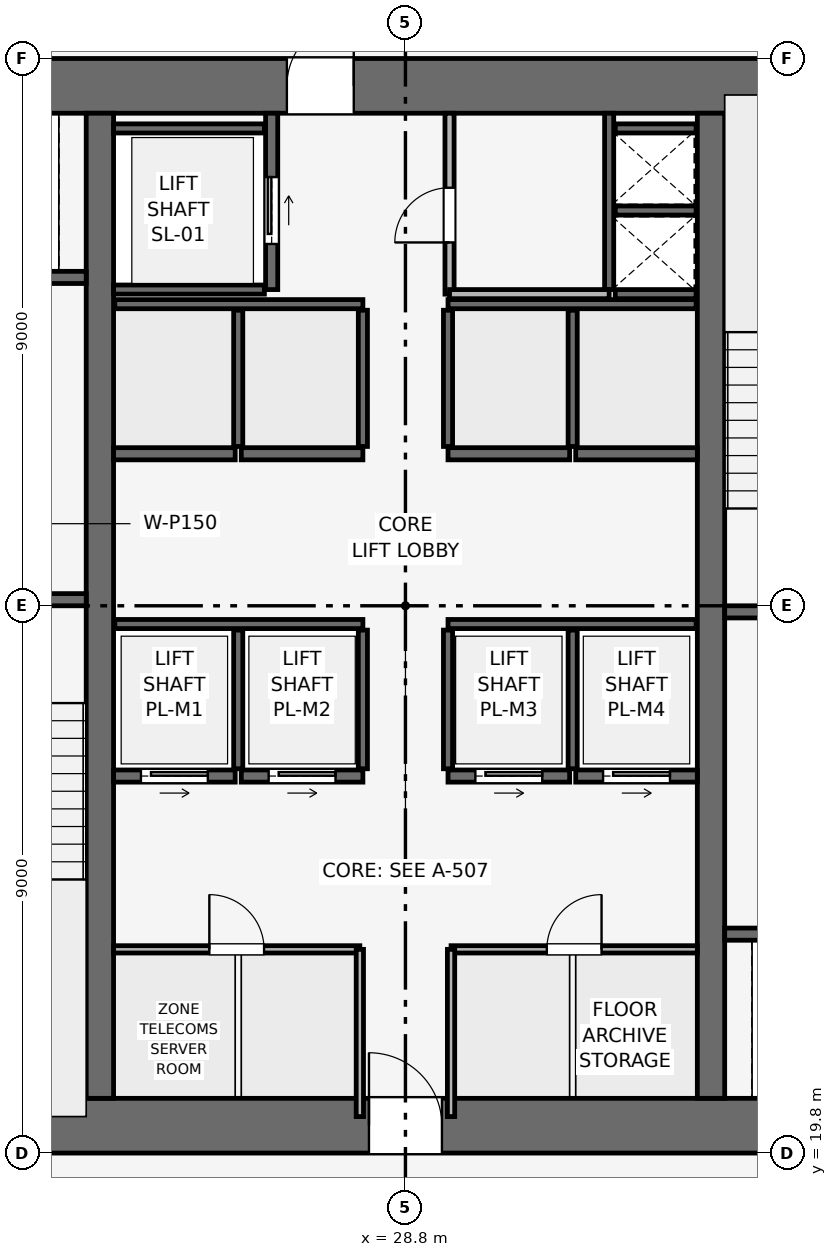
"""IFC4 building model, lengths in metres.
Left out: names, types, materials, properties, quantities, classifications, styles, units other than length and angle.
Written with IfcOpenShell. Run it as: python <this file> out.ifc"""

import sys

from ifc_helpers import new_model, si_unit, direction, frame, frame_2d, origin, place, context, subcontext, project, spatial, rectangle, extrude, element, fill, save


model = new_model("IFC4")
c1 = context("Model", 3, precision=1e-05, world=origin(), true_north=direction((0.0, 1.0)))
c2 = subcontext(c1, "Body", "Model", "MODEL_VIEW")
j1 = project(units=[si_unit("LENGTHUNIT", "METRE"), si_unit("PLANEANGLEUNIT", "RADIAN")], contexts=[c1])
p1 = place(None, origin())
s1 = spatial("IfcSite", under=j1, at=p1, CompositionType="ELEMENT")
p2 = place(p1, origin())
s2 = spatial("IfcBuilding", under=s1, at=p2, CompositionType="ELEMENT")
p3 = place(p2, frame((0.0, 0.0, 145.8)))
s3 = spatial("IfcBuildingStorey", under=s2, at=p3, CompositionType="ELEMENT", Elevation=145.8)
p4 = place(p3, frame((19.8, 20.25, 0.0), z_axis=(0.0, 0.0, 1.0), x_axis=(1.0, 0.0, 0.0)))
e1 = element("IfcWall", 1, at=p4, inside=s3, PredefinedType="SHEAR", context=c2, shape_type="SweptSolid", body=[
    extrude(rectangle(XDim=18.0, YDim=0.9, at=frame_2d((9.0, 0.0))), origin(), (0.0, 0.0, 1.0), 3.75),
])
p5 = place(p4, frame((8.4, 0.0, 0.0)))
e2 = element("IfcOpeningElement", 2, at=p5, cuts=e1, PredefinedType="OPENING", context=c2, shape_type="SweptSolid", body=[
    extrude(rectangle(XDim=1.2, YDim=2.2, at=frame_2d((0.6, 1.1))), frame((0.0, 0.46, 0.0), z_axis=(0.0, -1.0, 0.0), x_axis=(1.0, 0.0, 0.0)), (0.0, 0.0, 1.0), 0.92),
])
p6 = place(p3, frame((19.8, 37.35, 0.0), z_axis=(0.0, 0.0, 1.0), x_axis=(1.0, 0.0, 0.0)))
e3 = element("IfcWall", 3, at=p6, inside=s3, PredefinedType="SHEAR", context=c2, shape_type="SweptSolid", body=[
    extrude(rectangle(XDim=18.0, YDim=0.9, at=frame_2d((9.0, 0.0))), origin(), (0.0, 0.0, 1.0), 3.75),
])
p7 = place(p6, frame((7.05, 0.0, 0.0)))
e4 = element("IfcOpeningElement", 4, at=p7, cuts=e3, PredefinedType="OPENING", context=c2, shape_type="SweptSolid", body=[
    extrude(rectangle(XDim=1.1, YDim=2.15, at=frame_2d((0.55, 1.075))), frame((0.0, 0.46, 0.0), z_axis=(0.0, -1.0, 0.0), x_axis=(1.0, 0.0, 0.0)), (0.0, 0.0, 1.0), 0.92),
])
for number, where, z_axis, x_axis in (
    (5, (23.775, 20.7, 0.0), (0.0, 0.0, 1.0), (0.0, 1.0, 0.0)),
    (6, (33.825, 20.7, 0.0), (0.0, 0.0, 1.0), (0.0, 1.0, 0.0)),
):
    element("IfcWall", number, at=place(p3, frame(where, z_axis=z_axis, x_axis=x_axis)), inside=s3, PredefinedType="SHEAR", context=c2, shape_type="SweptSolid", body=[
        extrude(rectangle(XDim=16.2, YDim=0.45, at=frame_2d((8.1, 0.0))), origin(), (0.0, 0.0, 1.0), 3.75),
    ])
p8 = place(p3, frame((20.4, 28.9, 0.0), z_axis=(0.0, 0.0, 1.0), x_axis=(1.0, 0.0, 0.0)))
e7 = element("IfcWall", 7, at=p8, inside=s3, PredefinedType="SHEAR", context=c2, shape_type="SweptSolid", body=[
    extrude(rectangle(XDim=3.15, YDim=0.2, at=frame_2d((1.575, 0.0))), origin(), (0.0, 0.0, 1.0), 3.495),
])
p9 = place(p8, frame((0.8, 0.0, 0.0)))
e8 = element("IfcOpeningElement", 8, at=p9, cuts=e7, PredefinedType="OPENING", context=c2, shape_type="SweptSolid", body=[
    extrude(rectangle(XDim=1.0, YDim=2.1, at=frame_2d((0.5, 1.05))), frame((0.0, 0.11, 0.0), z_axis=(0.0, -1.0, 0.0), x_axis=(1.0, 0.0, 0.0)), (0.0, 0.0, 1.0), 0.22),
])
p10 = place(p3, frame((34.05, 28.7, 0.0), z_axis=(0.0, 0.0, 1.0), x_axis=(1.0, 0.0, 0.0)))
e9 = element("IfcWall", 9, at=p10, inside=s3, PredefinedType="SHEAR", context=c2, shape_type="SweptSolid", body=[
    extrude(rectangle(XDim=3.15, YDim=0.2, at=frame_2d((1.575, 0.0))), origin(), (0.0, 0.0, 1.0), 3.495),
])
p11 = place(p10, frame((0.8, 0.0, 0.0)))
e10 = element("IfcOpeningElement", 10, at=p11, cuts=e9, PredefinedType="OPENING", context=c2, shape_type="SweptSolid", body=[
    extrude(rectangle(XDim=1.0, YDim=2.1, at=frame_2d((0.5, 1.05))), frame((0.0, 0.11, 0.0), z_axis=(0.0, -1.0, 0.0), x_axis=(1.0, 0.0, 0.0)), (0.0, 0.0, 1.0), 0.22),
])
p12 = place(p3, frame((32.15, 34.0, 0.0), z_axis=(0.0, 0.0, 1.0), x_axis=(0.0, 1.0, 0.0)))
e11 = element("IfcWall", 11, at=p12, inside=s3, PredefinedType="SHEAR", context=c2, shape_type="SweptSolid", body=[
    extrude(rectangle(XDim=2.9, YDim=0.15, at=frame_2d((1.45, 0.0))), origin(), (0.0, 0.0, 1.0), 3.495),
])
for number, where, z_axis, x_axis in (
    (12, (32.25, 33.925, 0.0), (0.0, 0.0, 1.0), (1.0, 0.0, 0.0)),
    (13, (32.25, 35.3, 0.0), (0.0, 0.0, 1.0), (1.0, 0.0, 0.0)),
):
    element("IfcWall", number, at=place(p3, frame(where, z_axis=z_axis, x_axis=x_axis)), inside=s3, PredefinedType="SHEAR", context=c2, shape_type="SweptSolid", body=[
        extrude(rectangle(XDim=1.33, YDim=0.15, at=frame_2d((0.665, 0.0))), origin(), (0.0, 0.0, 1.0), 3.495),
    ])
p13 = place(p3, frame((20.5, 34.2, 0.0), z_axis=(0.0, 0.0, 1.0), x_axis=(1.0, 0.0, 0.0)))
e14 = element("IfcWall", 14, at=p13, inside=s3, PredefinedType="SHEAR", context=c2, shape_type="SweptSolid", body=[
    extrude(rectangle(XDim=3.05, YDim=0.2, at=frame_2d((1.525, 0.0))), origin(), (0.0, 0.0, 1.0), 3.495),
])
p14 = place(p13, frame((0.75, 0.0, 0.0)))
e15 = element("IfcOpeningElement", 15, at=p14, cuts=e14, PredefinedType="OPENING", context=c2, shape_type="SweptSolid", body=[
    extrude(rectangle(XDim=1.1, YDim=2.15, at=frame_2d((0.55, 1.075))), frame((0.0, 0.11, 0.0), z_axis=(0.0, -1.0, 0.0), x_axis=(1.0, 0.0, 0.0)), (0.0, 0.0, 1.0), 0.22),
])
p15 = place(p3, frame((34.05, 23.4, 0.0), z_axis=(0.0, 0.0, 1.0), x_axis=(1.0, 0.0, 0.0)))
e16 = element("IfcWall", 16, at=p15, inside=s3, PredefinedType="SHEAR", context=c2, shape_type="SweptSolid", body=[
    extrude(rectangle(XDim=3.05, YDim=0.2, at=frame_2d((1.525, 0.0))), origin(), (0.0, 0.0, 1.0), 3.495),
])
p16 = place(p15, frame((1.2, 0.0, 0.0)))
e17 = element("IfcOpeningElement", 17, at=p16, cuts=e16, PredefinedType="OPENING", context=c2, shape_type="SweptSolid", body=[
    extrude(rectangle(XDim=1.1, YDim=2.15, at=frame_2d((0.55, 1.075))), frame((0.0, 0.11, 0.0), z_axis=(0.0, -1.0, 0.0), x_axis=(1.0, 0.0, 0.0)), (0.0, 0.0, 1.0), 0.22),
])
p17 = place(p3, frame((26.6, 34.0, 0.0), z_axis=(0.0, 0.0, 1.0), x_axis=(0.0, 1.0, 0.0)))
e18 = element("IfcWall", 18, at=p17, inside=s3, PredefinedType="SHEAR", context=c2, shape_type="SweptSolid", body=[
    extrude(rectangle(XDim=2.9, YDim=0.2, at=frame_2d((1.45, 0.0))), origin(), (0.0, 0.0, 1.0), 3.495),
])
p18 = place(p17, frame((0.75, 0.0, 0.0)))
e19 = element("IfcOpeningElement", 19, at=p18, cuts=e18, PredefinedType="OPENING", context=c2, shape_type="SweptSolid", body=[
    extrude(rectangle(XDim=1.1, YDim=2.15, at=frame_2d((0.55, 1.075))), frame((0.0, 0.11, 0.0), z_axis=(0.0, -1.0, 0.0), x_axis=(1.0, 0.0, 0.0)), (0.0, 0.0, 1.0), 0.22),
])
for number, where, z_axis, x_axis in (
    (20, (24.0, 34.0, 0.0), (0.0, 0.0, 1.0), (1.0, 0.0, 0.0)),
    (21, (24.0, 36.65, 0.0), (0.0, 0.0, 1.0), (1.0, 0.0, 0.0)),
):
    element("IfcWall", number, at=place(p3, frame(where, z_axis=z_axis, x_axis=x_axis)), inside=s3, PredefinedType="SHEAR", context=c2, shape_type="SweptSolid", body=[
        extrude(rectangle(XDim=2.48, YDim=0.15, at=frame_2d((1.24, 0.0))), origin(), (0.0, 0.0, 1.0), 3.495),
    ])
p19 = place(p3, frame((24.0, 26.0, 0.0), z_axis=(0.0, 0.0, 1.0), x_axis=(1.0, 0.0, 0.0)))
e22 = element("IfcWall", 22, at=p19, inside=s3, PredefinedType="SHEAR", context=c2, shape_type="SweptSolid", body=[
    extrude(rectangle(XDim=2.0, YDim=0.2, at=frame_2d((1.0, 0.0))), origin(), (0.0, 0.0, 1.0), 3.495),
])
p20 = place(p19, frame((0.45, 0.0, 0.0)))
e23 = element("IfcOpeningElement", 23, at=p20, cuts=e22, PredefinedType="OPENING", context=c2, shape_type="SweptSolid", body=[
    extrude(rectangle(XDim=1.1, YDim=2.15, at=frame_2d((0.55, 1.075))), frame((0.0, 0.11, 0.0), z_axis=(0.0, -1.0, 0.0), x_axis=(1.0, 0.0, 0.0)), (0.0, 0.0, 1.0), 0.22),
])
p21 = place(p3, frame((26.1, 26.0, 0.0), z_axis=(0.0, 0.0, 1.0), x_axis=(1.0, 0.0, 0.0)))
e24 = element("IfcWall", 24, at=p21, inside=s3, PredefinedType="SHEAR", context=c2, shape_type="SweptSolid", body=[
    extrude(rectangle(XDim=2.0, YDim=0.2, at=frame_2d((1.0, 0.0))), origin(), (0.0, 0.0, 1.0), 3.495),
])
p22 = place(p21, frame((0.45, 0.0, 0.0)))
e25 = element("IfcOpeningElement", 25, at=p22, cuts=e24, PredefinedType="OPENING", context=c2, shape_type="SweptSolid", body=[
    extrude(rectangle(XDim=1.1, YDim=2.15, at=frame_2d((0.55, 1.075))), frame((0.0, 0.11, 0.0), z_axis=(0.0, -1.0, 0.0), x_axis=(1.0, 0.0, 0.0)), (0.0, 0.0, 1.0), 0.22),
])
p23 = place(p3, frame((29.5, 26.0, 0.0), z_axis=(0.0, 0.0, 1.0), x_axis=(1.0, 0.0, 0.0)))
e26 = element("IfcWall", 26, at=p23, inside=s3, PredefinedType="SHEAR", context=c2, shape_type="SweptSolid", body=[
    extrude(rectangle(XDim=2.0, YDim=0.2, at=frame_2d((1.0, 0.0))), origin(), (0.0, 0.0, 1.0), 3.495),
])
p24 = place(p23, frame((0.45, 0.0, 0.0)))
e27 = element("IfcOpeningElement", 27, at=p24, cuts=e26, PredefinedType="OPENING", context=c2, shape_type="SweptSolid", body=[
    extrude(rectangle(XDim=1.1, YDim=2.15, at=frame_2d((0.55, 1.075))), frame((0.0, 0.11, 0.0), z_axis=(0.0, -1.0, 0.0), x_axis=(1.0, 0.0, 0.0)), (0.0, 0.0, 1.0), 0.22),
])
p25 = place(p3, frame((31.6, 26.0, 0.0), z_axis=(0.0, 0.0, 1.0), x_axis=(1.0, 0.0, 0.0)))
e28 = element("IfcWall", 28, at=p25, inside=s3, PredefinedType="SHEAR", context=c2, shape_type="SweptSolid", body=[
    extrude(rectangle(XDim=2.0, YDim=0.2, at=frame_2d((1.0, 0.0))), origin(), (0.0, 0.0, 1.0), 3.495),
])
p26 = place(p25, frame((0.45, 0.0, 0.0)))
e29 = element("IfcOpeningElement", 29, at=p26, cuts=e28, PredefinedType="OPENING", context=c2, shape_type="SweptSolid", body=[
    extrude(rectangle(XDim=1.1, YDim=2.15, at=frame_2d((0.55, 1.075))), frame((0.0, 0.11, 0.0), z_axis=(0.0, -1.0, 0.0), x_axis=(1.0, 0.0, 0.0)), (0.0, 0.0, 1.0), 0.22),
])
for number, where, z_axis, x_axis in (
    (30, (24.0, 31.3, 0.0), (0.0, 0.0, 1.0), (1.0, 0.0, 0.0)),
    (31, (26.1, 31.3, 0.0), (0.0, 0.0, 1.0), (1.0, 0.0, 0.0)),
    (32, (29.5, 31.3, 0.0), (0.0, 0.0, 1.0), (1.0, 0.0, 0.0)),
    (33, (31.6, 31.3, 0.0), (0.0, 0.0, 1.0), (1.0, 0.0, 0.0)),
):
    element("IfcWall", number, at=place(p3, frame(where, z_axis=z_axis, x_axis=x_axis)), inside=s3, PredefinedType="SHEAR", context=c2, shape_type="SweptSolid", body=[
        extrude(rectangle(XDim=2.0, YDim=0.2, at=frame_2d((1.0, 0.0))), origin(), (0.0, 0.0, 1.0), 3.495),
    ])
p27 = place(p3, frame((32.25, 36.65, 0.0), z_axis=(0.0, 0.0, 1.0), x_axis=(1.0, 0.0, 0.0)))
e34 = element("IfcWall", 34, at=p27, inside=s3, PredefinedType="SHEAR", context=c2, shape_type="SweptSolid", body=[
    extrude(rectangle(XDim=1.33, YDim=0.15, at=frame_2d((0.665, 0.0))), origin(), (0.0, 0.0, 1.0), 3.495),
])
for number, where, z_axis, x_axis in (
    (35, (24.02, 28.5, 0.0), (0.0, 0.0, 1.0), (1.0, 0.0, 0.0)),
    (36, (29.5, 28.5, 0.0), (0.0, 0.0, 1.0), (1.0, 0.0, 0.0)),
):
    element("IfcWall", number, at=place(p3, frame(where, z_axis=z_axis, x_axis=x_axis)), inside=s3, PredefinedType="SHEAR", context=c2, shape_type="SweptSolid", body=[
        extrude(rectangle(XDim=4.08, YDim=0.15, at=frame_2d((2.04, 0.0))), origin(), (0.0, 0.0, 1.0), 3.495),
    ])
for number, where, z_axis, x_axis in (
    (37, (26.05, 26.12, 0.0), (0.0, 0.0, 1.0), (0.0, 1.0, 0.0)),
    (38, (28.1, 26.12, 0.0), (0.0, 0.0, 1.0), (0.0, 1.0, 0.0)),
    (39, (29.5, 26.12, 0.0), (0.0, 0.0, 1.0), (0.0, 1.0, 0.0)),
    (40, (31.55, 26.12, 0.0), (0.0, 0.0, 1.0), (0.0, 1.0, 0.0)),
):
    element("IfcWall", number, at=place(p3, frame(where, z_axis=z_axis, x_axis=x_axis)), inside=s3, PredefinedType="SHEAR", context=c2, shape_type="SweptSolid", body=[
        extrude(rectangle(XDim=2.28, YDim=0.15, at=frame_2d((1.14, 0.0))), origin(), (0.0, 0.0, 1.0), 3.495),
    ])
for number, where, z_axis, x_axis in (
    (41, (24.02, 33.76, 0.0), (0.0, 0.0, 1.0), (1.0, 0.0, 0.0)),
    (42, (29.5, 33.76, 0.0), (0.0, 0.0, 1.0), (1.0, 0.0, 0.0)),
):
    element("IfcWall", number, at=place(p3, frame(where, z_axis=z_axis, x_axis=x_axis)), inside=s3, PredefinedType="SHEAR", context=c2, shape_type="SweptSolid", body=[
        extrude(rectangle(XDim=4.08, YDim=0.15, at=frame_2d((2.04, 0.0))), origin(), (0.0, 0.0, 1.0), 3.495),
    ])
for number, where, z_axis, x_axis in (
    (43, (26.05, 31.42, 0.0), (0.0, 0.0, 1.0), (0.0, 1.0, 0.0)),
    (44, (28.1, 31.42, 0.0), (0.0, 0.0, 1.0), (0.0, 1.0, 0.0)),
    (45, (29.5, 31.42, 0.0), (0.0, 0.0, 1.0), (0.0, 1.0, 0.0)),
    (46, (31.55, 31.42, 0.0), (0.0, 0.0, 1.0), (0.0, 1.0, 0.0)),
):
    element("IfcWall", number, at=place(p3, frame(where, z_axis=z_axis, x_axis=x_axis)), inside=s3, PredefinedType="SHEAR", context=c2, shape_type="SweptSolid", body=[
        extrude(rectangle(XDim=2.24, YDim=0.15, at=frame_2d((1.12, 0.0))), origin(), (0.0, 0.0, 1.0), 3.495),
    ])
p28 = place(p3, frame((29.525, 33.925, 0.0), z_axis=(0.0, 0.0, 1.0), x_axis=(0.0, 1.0, 0.0)))
e47 = element("IfcWall", 47, at=p28, inside=s3, PredefinedType="PARTITIONING", context=c2, shape_type="SweptSolid", body=[
    extrude(rectangle(XDim=2.975, YDim=0.15, at=frame_2d((1.487, 0.0))), origin(), (0.0, 0.0, 1.0), 3.495),
])
p29 = place(p28, frame((0.85, 0.0, 0.0)))
e48 = element("IfcOpeningElement", 48, at=p29, cuts=e47, PredefinedType="OPENING", context=c2, shape_type="SweptSolid", body=[
    extrude(rectangle(XDim=0.9, YDim=2.1, at=frame_2d((0.45, 1.05))), frame((0.0, 0.085, 0.0), z_axis=(0.0, -1.0, 0.0), x_axis=(1.0, 0.0, 0.0)), (0.0, 0.0, 1.0), 0.17),
])
p30 = place(p3, frame((29.525, 33.925, 0.0), z_axis=(0.0, 0.0, 1.0), x_axis=(1.0, 0.0, 0.0)))
e49 = element("IfcWall", 49, at=p30, inside=s3, PredefinedType="PARTITIONING", context=c2, shape_type="SweptSolid", body=[
    extrude(rectangle(XDim=2.625, YDim=0.15, at=frame_2d((1.312, 0.0))), origin(), (0.0, 0.0, 1.0), 3.495),
])
p31 = place(p3, frame((24.0, 23.15, 0.0), z_axis=(0.0, 0.0, 1.0), x_axis=(1.0, 0.0, 0.0)))
e50 = element("IfcWall", 50, at=p31, inside=s3, PredefinedType="PARTITIONING", context=c2, shape_type="SweptSolid", body=[
    extrude(rectangle(XDim=4.05, YDim=0.12, at=frame_2d((2.025, 0.0))), origin(), (0.0, 0.0, 1.0), 3.495),
])
p32 = place(p31, frame((1.575, 0.0, 0.0)))
e51 = element("IfcOpeningElement", 51, at=p32, cuts=e50, PredefinedType="OPENING", context=c2, shape_type="SweptSolid", body=[
    extrude(rectangle(XDim=0.9, YDim=2.1, at=frame_2d((0.45, 1.05))), frame((0.0, 0.07, 0.0), z_axis=(0.0, -1.0, 0.0), x_axis=(1.0, 0.0, 0.0)), (0.0, 0.0, 1.0), 0.14),
])
p33 = place(p3, frame((28.05, 20.4, 0.0), z_axis=(0.0, 0.0, 1.0), x_axis=(0.0, 1.0, 0.0)))
e52 = element("IfcWall", 52, at=p33, inside=s3, PredefinedType="PARTITIONING", context=c2, shape_type="SweptSolid", body=[
    extrude(rectangle(XDim=2.75, YDim=0.12, at=frame_2d((1.375, 0.0))), origin(), (0.0, 0.0, 1.0), 3.495),
])
p34 = place(p3, frame((29.55, 23.15, 0.0), z_axis=(0.0, 0.0, 1.0), x_axis=(1.0, 0.0, 0.0)))
e53 = element("IfcWall", 53, at=p34, inside=s3, PredefinedType="PARTITIONING", context=c2, shape_type="SweptSolid", body=[
    extrude(rectangle(XDim=4.05, YDim=0.12, at=frame_2d((2.025, 0.0))), origin(), (0.0, 0.0, 1.0), 3.495),
])
p35 = place(p34, frame((1.575, 0.0, 0.0)))
e54 = element("IfcOpeningElement", 54, at=p35, cuts=e53, PredefinedType="OPENING", context=c2, shape_type="SweptSolid", body=[
    extrude(rectangle(XDim=0.9, YDim=2.1, at=frame_2d((0.45, 1.05))), frame((0.0, 0.07, 0.0), z_axis=(0.0, -1.0, 0.0), x_axis=(1.0, 0.0, 0.0)), (0.0, 0.0, 1.0), 0.14),
])
p36 = place(p3, frame((29.55, 20.4, 0.0), z_axis=(0.0, 0.0, 1.0), x_axis=(0.0, 1.0, 0.0)))
e55 = element("IfcWall", 55, at=p36, inside=s3, PredefinedType="PARTITIONING", context=c2, shape_type="SweptSolid", body=[
    extrude(rectangle(XDim=2.75, YDim=0.12, at=frame_2d((1.375, 0.0))), origin(), (0.0, 0.0, 1.0), 3.495),
])
p37 = place(p18, origin())
e56 = element("IfcDoor", 56, at=p37, inside=s3, OperationType="SLIDING_TO_RIGHT", PredefinedType="DOOR", context=c2, shape_type="SweptSolid", body=[
    extrude(rectangle(XDim=1.1, YDim=2.15, at=frame_2d((0.55, 1.075))), frame((0.0, 0.025, 0.0), z_axis=(0.0, -1.0, 0.0), x_axis=(1.0, 0.0, 0.0)), (0.0, 0.0, 1.0), 0.05),
])
fill(e19, e56)
p38 = place(p20, origin())
e57 = element("IfcDoor", 57, at=p38, inside=s3, OperationType="SLIDING_TO_RIGHT", PredefinedType="DOOR", context=c2, shape_type="SweptSolid", body=[
    extrude(rectangle(XDim=1.1, YDim=2.15, at=frame_2d((0.55, 1.075))), frame((0.0, 0.025, 0.0), z_axis=(0.0, -1.0, 0.0), x_axis=(1.0, 0.0, 0.0)), (0.0, 0.0, 1.0), 0.05),
])
fill(e23, e57)
p39 = place(p22, origin())
e58 = element("IfcDoor", 58, at=p39, inside=s3, OperationType="SLIDING_TO_RIGHT", PredefinedType="DOOR", context=c2, shape_type="SweptSolid", body=[
    extrude(rectangle(XDim=1.1, YDim=2.15, at=frame_2d((0.55, 1.075))), frame((0.0, 0.025, 0.0), z_axis=(0.0, -1.0, 0.0), x_axis=(1.0, 0.0, 0.0)), (0.0, 0.0, 1.0), 0.05),
])
fill(e25, e58)
p40 = place(p24, origin())
e59 = element("IfcDoor", 59, at=p40, inside=s3, OperationType="SLIDING_TO_RIGHT", PredefinedType="DOOR", context=c2, shape_type="SweptSolid", body=[
    extrude(rectangle(XDim=1.1, YDim=2.15, at=frame_2d((0.55, 1.075))), frame((0.0, 0.025, 0.0), z_axis=(0.0, -1.0, 0.0), x_axis=(1.0, 0.0, 0.0)), (0.0, 0.0, 1.0), 0.05),
])
fill(e27, e59)
p41 = place(p26, origin())
e60 = element("IfcDoor", 60, at=p41, inside=s3, OperationType="SLIDING_TO_RIGHT", PredefinedType="DOOR", context=c2, shape_type="SweptSolid", body=[
    extrude(rectangle(XDim=1.1, YDim=2.15, at=frame_2d((0.55, 1.075))), frame((0.0, 0.025, 0.0), z_axis=(0.0, -1.0, 0.0), x_axis=(1.0, 0.0, 0.0)), (0.0, 0.0, 1.0), 0.05),
])
fill(e29, e60)
p42 = place(p29, origin())
e61 = element("IfcDoor", 61, at=p42, inside=s3, OperationType="SINGLE_SWING_LEFT", PredefinedType="DOOR", context=c2, shape_type="SweptSolid", body=[
    extrude(rectangle(XDim=0.9, YDim=2.1, at=frame_2d((0.45, 1.05))), frame((0.0, 0.025, 0.0), z_axis=(0.0, -1.0, 0.0), x_axis=(1.0, 0.0, 0.0)), (0.0, 0.0, 1.0), 0.05),
])
fill(e48, e61)
p43 = place(p32, origin())
e62 = element("IfcDoor", 62, at=p43, inside=s3, OperationType="SINGLE_SWING_LEFT", PredefinedType="DOOR", context=c2, shape_type="SweptSolid", body=[
    extrude(rectangle(XDim=0.9, YDim=2.1, at=frame_2d((0.45, 1.05))), frame((0.0, 0.025, 0.0), z_axis=(0.0, -1.0, 0.0), x_axis=(1.0, 0.0, 0.0)), (0.0, 0.0, 1.0), 0.05),
])
fill(e51, e62)
p44 = place(p35, origin())
e63 = element("IfcDoor", 63, at=p44, inside=s3, OperationType="SINGLE_SWING_RIGHT", PredefinedType="DOOR", context=c2, shape_type="SweptSolid", body=[
    extrude(rectangle(XDim=0.9, YDim=2.1, at=frame_2d((0.45, 1.05))), frame((0.0, 0.025, 0.0), z_axis=(0.0, -1.0, 0.0), x_axis=(1.0, 0.0, 0.0)), (0.0, 0.0, 1.0), 0.05),
])
fill(e54, e63)
p45 = place(p5, origin())
e64 = element("IfcDoor", 64, at=p45, inside=s3, OperationType="SINGLE_SWING_LEFT", PredefinedType="DOOR", context=c2, shape_type="SweptSolid", body=[
    extrude(rectangle(XDim=1.2, YDim=2.2, at=frame_2d((0.6, 1.1))), frame((0.0, 0.025, 0.0), z_axis=(0.0, -1.0, 0.0), x_axis=(1.0, 0.0, 0.0)), (0.0, 0.0, 1.0), 0.05),
])
fill(e2, e64)
p46 = place(p7, origin())
e65 = element("IfcDoor", 65, at=p46, inside=s3, OperationType="SINGLE_SWING_RIGHT", PredefinedType="DOOR", context=c2, shape_type="SweptSolid", body=[
    extrude(rectangle(XDim=1.1, YDim=2.15, at=frame_2d((0.55, 1.075))), frame((0.0, 0.025, 0.0), z_axis=(0.0, -1.0, 0.0), x_axis=(1.0, 0.0, 0.0)), (0.0, 0.0, 1.0), 0.05),
])
fill(e4, e65)
save(model, sys.argv[1])
